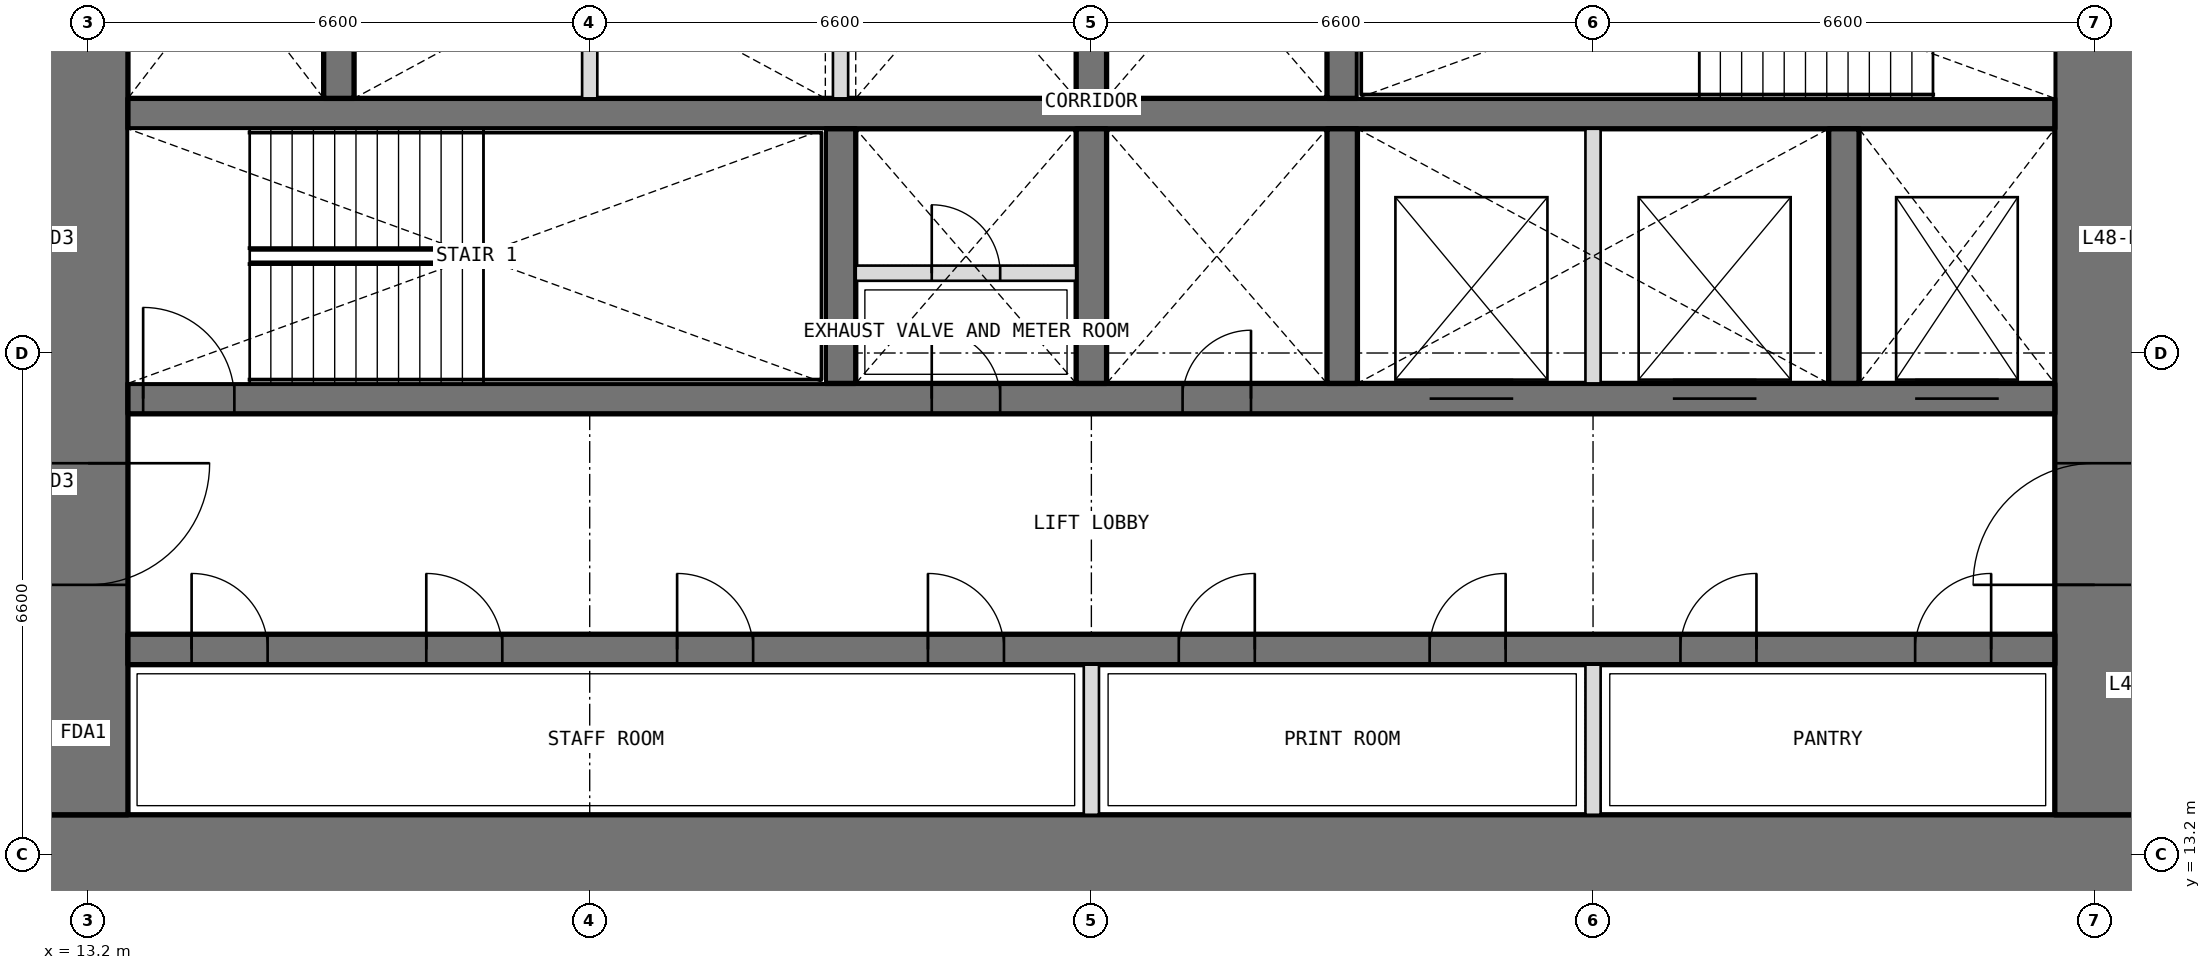
"""IFC4 building model, lengths in metres.
Left out: names, types, materials, properties, quantities, classifications, styles, units other than length and angle.
Written with IfcOpenShell. Run it as: python <this file> out.ifc"""

import sys

from ifc_helpers import new_model, si_unit, direction, frame, frame_2d, origin, place, context, subcontext, project, spatial, rectangle, extrude, element, fill, save


model = new_model("IFC4")
c1 = context("Model", 3, precision=1e-05, world=origin(), true_north=direction((0.0, 1.0)))
c2 = subcontext(c1, "Body", "Model", "MODEL_VIEW")
j1 = project(units=[si_unit("LENGTHUNIT", "METRE"), si_unit("PLANEANGLEUNIT", "RADIAN")], contexts=[c1])
p1 = place(None, origin())
s1 = spatial("IfcSite", under=j1, at=p1, CompositionType="ELEMENT")
p2 = place(p1, origin())
s2 = spatial("IfcBuilding", under=s1, at=p2, CompositionType="ELEMENT")
p3 = place(p2, frame((0.0, 0.0, 210.3)))
s3 = spatial("IfcBuildingStorey", under=s2, at=p3, CompositionType="ELEMENT", Elevation=210.3)
p4 = place(p3, frame((12.675, 13.2, 0.0), z_axis=(0.0, 0.0, 1.0), x_axis=(1.0, 0.0, 0.0)))
e1 = element("IfcWall", 1, at=p4, inside=s3, PredefinedType="SHEAR", context=c2, shape_type="SweptSolid", body=[
    extrude(rectangle(XDim=27.45, YDim=1.05, at=frame_2d((13.725, 0.0))), origin(), (0.0, 0.0, 1.0), 4.2),
])
p5 = place(p3, frame((39.6, 13.725, 0.0), z_axis=(0.0, 0.0, 1.0), x_axis=(0.0, 1.0, 0.0)))
e2 = element("IfcWall", 2, at=p5, inside=s3, PredefinedType="SHEAR", context=c2, shape_type="SweptSolid", body=[
    extrude(rectangle(XDim=18.75, YDim=1.05, at=frame_2d((9.375, 0.0))), origin(), (0.0, 0.0, 1.0), 4.2),
])
p6 = place(p5, frame((3.025, 0.0, 0.0)))
e3 = element("IfcOpeningElement", 3, at=p6, cuts=e2, PredefinedType="OPENING", context=c2, shape_type="SweptSolid", body=[
    extrude(rectangle(XDim=1.6, YDim=2.1, at=frame_2d((0.8, 1.05))), frame((0.0, 0.535, 0.0), z_axis=(0.0, -1.0, 0.0), x_axis=(1.0, 0.0, 0.0)), (0.0, 0.0, 1.0), 1.07),
])
p7 = place(p5, frame((13.825, 0.0, 0.0)))
e4 = element("IfcOpeningElement", 4, at=p7, cuts=e2, PredefinedType="OPENING", context=c2, shape_type="SweptSolid", body=[
    extrude(rectangle(XDim=1.6, YDim=2.1, at=frame_2d((0.8, 1.05))), frame((0.0, 0.535, 0.0), z_axis=(0.0, -1.0, 0.0), x_axis=(1.0, 0.0, 0.0)), (0.0, 0.0, 1.0), 1.07),
])
p8 = place(p3, frame((13.2, 32.475, 0.0), z_axis=(0.0, 0.0, 1.0), x_axis=(0.0, -1.0, 0.0)))
e5 = element("IfcWall", 5, at=p8, inside=s3, PredefinedType="SHEAR", context=c2, shape_type="SweptSolid", body=[
    extrude(rectangle(XDim=18.75, YDim=1.05, at=frame_2d((9.375, 0.0))), origin(), (0.0, 0.0, 1.0), 4.2),
])
p9 = place(p8, frame((14.125, 0.0, 0.0)))
e6 = element("IfcOpeningElement", 6, at=p9, cuts=e5, PredefinedType="OPENING", context=c2, shape_type="SweptSolid", body=[
    extrude(rectangle(XDim=1.6, YDim=2.1, at=frame_2d((0.8, 1.05))), frame((0.0, 0.535, 0.0), z_axis=(0.0, -1.0, 0.0), x_axis=(1.0, 0.0, 0.0)), (0.0, 0.0, 1.0), 1.07),
])
p10 = place(p8, frame((3.325, 0.0, 0.0)))
e7 = element("IfcOpeningElement", 7, at=p10, cuts=e5, PredefinedType="OPENING", context=c2, shape_type="SweptSolid", body=[
    extrude(rectangle(XDim=1.6, YDim=2.1, at=frame_2d((0.8, 1.05))), frame((0.0, 0.535, 0.0), z_axis=(0.0, -1.0, 0.0), x_axis=(1.0, 0.0, 0.0)), (0.0, 0.0, 1.0), 1.07),
])
p11 = place(p3, frame((13.725, 15.9, 0.0), z_axis=(0.0, 0.0, 1.0), x_axis=(1.0, 0.0, 0.0)))
e8 = element("IfcWall", 8, at=p11, inside=s3, PredefinedType="SHEAR", context=c2, shape_type="SweptSolid", body=[
    extrude(rectangle(XDim=25.35, YDim=0.4, at=frame_2d((12.675, 0.0))), origin(), (0.0, 0.0, 1.0), 4.2),
])
p12 = place(p11, frame((0.837, 0.0, 0.0)))
e9 = element("IfcOpeningElement", 9, at=p12, cuts=e8, PredefinedType="OPENING", context=c2, shape_type="SweptSolid", body=[
    extrude(rectangle(XDim=1.0, YDim=2.1, at=frame_2d((0.5, 1.05))), frame((0.0, 0.21, 0.0), z_axis=(0.0, -1.0, 0.0), x_axis=(1.0, 0.0, 0.0)), (0.0, 0.0, 1.0), 0.42),
])
p13 = place(p11, frame((3.925, 0.0, 0.0)))
e10 = element("IfcOpeningElement", 10, at=p13, cuts=e8, PredefinedType="OPENING", context=c2, shape_type="SweptSolid", body=[
    extrude(rectangle(XDim=1.0, YDim=2.1, at=frame_2d((0.5, 1.05))), frame((0.0, 0.21, 0.0), z_axis=(0.0, -1.0, 0.0), x_axis=(1.0, 0.0, 0.0)), (0.0, 0.0, 1.0), 0.42),
])
p14 = place(p11, frame((7.225, 0.0, 0.0)))
e11 = element("IfcOpeningElement", 11, at=p14, cuts=e8, PredefinedType="OPENING", context=c2, shape_type="SweptSolid", body=[
    extrude(rectangle(XDim=1.0, YDim=2.1, at=frame_2d((0.5, 1.05))), frame((0.0, 0.21, 0.0), z_axis=(0.0, -1.0, 0.0), x_axis=(1.0, 0.0, 0.0)), (0.0, 0.0, 1.0), 0.42),
])
p15 = place(p11, frame((10.525, 0.0, 0.0)))
e12 = element("IfcOpeningElement", 12, at=p15, cuts=e8, PredefinedType="OPENING", context=c2, shape_type="SweptSolid", body=[
    extrude(rectangle(XDim=1.0, YDim=2.1, at=frame_2d((0.5, 1.05))), frame((0.0, 0.21, 0.0), z_axis=(0.0, -1.0, 0.0), x_axis=(1.0, 0.0, 0.0)), (0.0, 0.0, 1.0), 0.42),
])
p16 = place(p11, frame((13.825, 0.0, 0.0)))
e13 = element("IfcOpeningElement", 13, at=p16, cuts=e8, PredefinedType="OPENING", context=c2, shape_type="SweptSolid", body=[
    extrude(rectangle(XDim=1.0, YDim=2.1, at=frame_2d((0.5, 1.05))), frame((0.0, 0.21, 0.0), z_axis=(0.0, -1.0, 0.0), x_axis=(1.0, 0.0, 0.0)), (0.0, 0.0, 1.0), 0.42),
])
p17 = place(p11, frame((17.125, 0.0, 0.0)))
e14 = element("IfcOpeningElement", 14, at=p17, cuts=e8, PredefinedType="OPENING", context=c2, shape_type="SweptSolid", body=[
    extrude(rectangle(XDim=1.0, YDim=2.1, at=frame_2d((0.5, 1.05))), frame((0.0, 0.21, 0.0), z_axis=(0.0, -1.0, 0.0), x_axis=(1.0, 0.0, 0.0)), (0.0, 0.0, 1.0), 0.42),
])
p18 = place(p11, frame((20.425, 0.0, 0.0)))
e15 = element("IfcOpeningElement", 15, at=p18, cuts=e8, PredefinedType="OPENING", context=c2, shape_type="SweptSolid", body=[
    extrude(rectangle(XDim=1.0, YDim=2.1, at=frame_2d((0.5, 1.05))), frame((0.0, 0.21, 0.0), z_axis=(0.0, -1.0, 0.0), x_axis=(1.0, 0.0, 0.0)), (0.0, 0.0, 1.0), 0.42),
])
p19 = place(p11, frame((23.512, 0.0, 0.0)))
e16 = element("IfcOpeningElement", 16, at=p19, cuts=e8, PredefinedType="OPENING", context=c2, shape_type="SweptSolid", body=[
    extrude(rectangle(XDim=1.0, YDim=2.1, at=frame_2d((0.5, 1.05))), frame((0.0, 0.21, 0.0), z_axis=(0.0, -1.0, 0.0), x_axis=(1.0, 0.0, 0.0)), (0.0, 0.0, 1.0), 0.42),
])
p20 = place(p3, frame((13.725, 19.2, 0.0), z_axis=(0.0, 0.0, 1.0), x_axis=(1.0, 0.0, 0.0)))
e17 = element("IfcWall", 17, at=p20, inside=s3, PredefinedType="SHEAR", context=c2, shape_type="SweptSolid", body=[
    extrude(rectangle(XDim=25.35, YDim=0.4, at=frame_2d((12.675, 0.0))), origin(), (0.0, 0.0, 1.0), 4.2),
])
p21 = place(p20, frame((10.575, 0.0, 0.0)))
e18 = element("IfcOpeningElement", 18, at=p21, cuts=e17, PredefinedType="OPENING", context=c2, shape_type="SweptSolid", body=[
    extrude(rectangle(XDim=0.9, YDim=2.1, at=frame_2d((0.45, 1.05))), frame((0.0, 0.21, 0.0), z_axis=(0.0, -1.0, 0.0), x_axis=(1.0, 0.0, 0.0)), (0.0, 0.0, 1.0), 0.42),
])
p22 = place(p20, frame((13.875, 0.0, 0.0)))
e19 = element("IfcOpeningElement", 19, at=p22, cuts=e17, PredefinedType="OPENING", context=c2, shape_type="SweptSolid", body=[
    extrude(rectangle(XDim=0.9, YDim=2.1, at=frame_2d((0.45, 1.05))), frame((0.0, 0.21, 0.0), z_axis=(0.0, -1.0, 0.0), x_axis=(1.0, 0.0, 0.0)), (0.0, 0.0, 1.0), 0.42),
])
p23 = place(p20, frame((0.2, 0.0, 0.0)))
e20 = element("IfcOpeningElement", 20, at=p23, cuts=e17, PredefinedType="OPENING", context=c2, shape_type="SweptSolid", body=[
    extrude(rectangle(XDim=1.2, YDim=2.1, at=frame_2d((0.6, 1.05))), frame((0.0, 0.21, 0.0), z_axis=(0.0, -1.0, 0.0), x_axis=(1.0, 0.0, 0.0)), (0.0, 0.0, 1.0), 0.42),
])
p24 = place(p20, frame((23.512, 0.0, 0.0)))
e21 = element("IfcOpeningElement", 21, at=p24, cuts=e17, PredefinedType="OPENING", context=c2, shape_type="SweptSolid", body=[
    extrude(rectangle(XDim=1.1, YDim=2.1, at=frame_2d((0.55, 1.05))), frame((0.0, 0.21, 0.0), z_axis=(0.0, -1.0, 0.0), x_axis=(1.0, 0.0, 0.0)), (0.0, 0.0, 1.0), 0.42),
])
p25 = place(p20, frame((17.125, 0.0, 0.0)))
e22 = element("IfcOpeningElement", 22, at=p25, cuts=e17, PredefinedType="OPENING", context=c2, shape_type="SweptSolid", body=[
    extrude(rectangle(XDim=1.1, YDim=2.1, at=frame_2d((0.55, 1.05))), frame((0.0, 0.21, 0.0), z_axis=(0.0, -1.0, 0.0), x_axis=(1.0, 0.0, 0.0)), (0.0, 0.0, 1.0), 0.42),
])
p26 = place(p20, frame((20.325, 0.0, 0.0)))
e23 = element("IfcOpeningElement", 23, at=p26, cuts=e17, PredefinedType="OPENING", context=c2, shape_type="SweptSolid", body=[
    extrude(rectangle(XDim=1.1, YDim=2.1, at=frame_2d((0.55, 1.05))), frame((0.0, 0.21, 0.0), z_axis=(0.0, -1.0, 0.0), x_axis=(1.0, 0.0, 0.0)), (0.0, 0.0, 1.0), 0.42),
])
p27 = place(p3, frame((13.725, 22.95, 0.0), z_axis=(0.0, 0.0, 1.0), x_axis=(1.0, 0.0, 0.0)))
e24 = element("IfcWall", 24, at=p27, inside=s3, PredefinedType="SHEAR", context=c2, shape_type="SweptSolid", body=[
    extrude(rectangle(XDim=25.35, YDim=0.4, at=frame_2d((12.675, 0.0))), origin(), (0.0, 0.0, 1.0), 4.2),
])
for number, where, z_axis, x_axis in (
    (25, (23.1, 19.4, 0.0), (0.0, 0.0, 1.0), (0.0, 1.0, 0.0)),
    (26, (26.4, 19.4, 0.0), (0.0, 0.0, 1.0), (0.0, 1.0, 0.0)),
    (27, (29.7, 19.4, 0.0), (0.0, 0.0, 1.0), (0.0, 1.0, 0.0)),
    (28, (36.3, 19.4, 0.0), (0.0, 0.0, 1.0), (0.0, 1.0, 0.0)),
    (29, (16.5, 23.15, 0.0), (0.0, 0.0, 1.0), (0.0, 1.0, 0.0)),
    (30, (26.4, 23.15, 0.0), (0.0, 0.0, 1.0), (0.0, 1.0, 0.0)),
    (31, (29.7, 23.15, 0.0), (0.0, 0.0, 1.0), (0.0, 1.0, 0.0)),
):
    element("IfcWall", number, at=place(p3, frame(where, z_axis=z_axis, x_axis=x_axis)), inside=s3, PredefinedType="SHEAR", context=c2, shape_type="SweptSolid", body=[
        extrude(rectangle(XDim=3.35, YDim=0.4, at=frame_2d((1.675, 0.0))), origin(), (0.0, 0.0, 1.0), 4.2),
    ])
for number, where, z_axis, x_axis in (
    (32, (26.4, 13.725, 0.0), (0.0, 0.0, 1.0), (0.0, 1.0, 0.0)),
    (33, (33.0, 13.725, 0.0), (0.0, 0.0, 1.0), (0.0, 1.0, 0.0)),
):
    element("IfcWall", number, at=place(p3, frame(where, z_axis=z_axis, x_axis=x_axis)), inside=s3, PredefinedType="PARTITIONING", context=c2, shape_type="SweptSolid", body=[
        extrude(rectangle(XDim=1.975, YDim=0.2, at=frame_2d((0.987, 0.0))), origin(), (0.0, 0.0, 1.0), 4.2),
    ])
for number, where, z_axis, x_axis in (
    (34, (33.0, 19.4, 0.0), (0.0, 0.0, 1.0), (0.0, 1.0, 0.0)),
    (35, (19.8, 23.15, 0.0), (0.0, 0.0, 1.0), (0.0, 1.0, 0.0)),
    (36, (23.1, 23.15, 0.0), (0.0, 0.0, 1.0), (0.0, 1.0, 0.0)),
):
    element("IfcWall", number, at=place(p3, frame(where, z_axis=z_axis, x_axis=x_axis)), inside=s3, PredefinedType="PARTITIONING", context=c2, shape_type="SweptSolid", body=[
        extrude(rectangle(XDim=3.35, YDim=0.2, at=frame_2d((1.675, 0.0))), origin(), (0.0, 0.0, 1.0), 4.2),
    ])
p28 = place(p3, frame((23.3, 20.85, 0.0), z_axis=(0.0, 0.0, 1.0), x_axis=(1.0, 0.0, 0.0)))
e37 = element("IfcWall", 37, at=p28, inside=s3, PredefinedType="PARTITIONING", context=c2, shape_type="SweptSolid", body=[
    extrude(rectangle(XDim=2.9, YDim=0.2, at=frame_2d((1.45, 0.0))), origin(), (0.0, 0.0, 1.0), 3.9),
])
p29 = place(p28, frame((1.0, 0.0, 0.0)))
e38 = element("IfcOpeningElement", 38, at=p29, cuts=e37, PredefinedType="OPENING", context=c2, shape_type="SweptSolid", body=[
    extrude(rectangle(XDim=0.9, YDim=2.1, at=frame_2d((0.45, 1.05))), frame((0.0, 0.11, 0.0), z_axis=(0.0, -1.0, 0.0), x_axis=(1.0, 0.0, 0.0)), (0.0, 0.0, 1.0), 0.22),
])
p30 = place(p21, origin())
e39 = element("IfcDoor", 39, at=p30, inside=s3, OperationType="SINGLE_SWING_LEFT", PredefinedType="DOOR", context=c2, shape_type="SweptSolid", body=[
    extrude(rectangle(XDim=0.9, YDim=2.1, at=frame_2d((0.45, 1.05))), frame((0.0, 0.025, 0.0), z_axis=(0.0, -1.0, 0.0), x_axis=(1.0, 0.0, 0.0)), (0.0, 0.0, 1.0), 0.05),
])
fill(e18, e39)
p31 = place(p29, origin())
e40 = element("IfcDoor", 40, at=p31, inside=s3, OperationType="SINGLE_SWING_LEFT", PredefinedType="DOOR", context=c2, shape_type="SweptSolid", body=[
    extrude(rectangle(XDim=0.9, YDim=2.1, at=frame_2d((0.45, 1.05))), frame((0.0, 0.025, 0.0), z_axis=(0.0, -1.0, 0.0), x_axis=(1.0, 0.0, 0.0)), (0.0, 0.0, 1.0), 0.05),
])
fill(e38, e40)
p32 = place(p22, origin())
e41 = element("IfcDoor", 41, at=p32, inside=s3, OperationType="SINGLE_SWING_RIGHT", PredefinedType="DOOR", context=c2, shape_type="SweptSolid", body=[
    extrude(rectangle(XDim=0.9, YDim=2.1, at=frame_2d((0.45, 1.05))), frame((0.0, 0.025, 0.0), z_axis=(0.0, -1.0, 0.0), x_axis=(1.0, 0.0, 0.0)), (0.0, 0.0, 1.0), 0.05),
])
fill(e19, e41)
p33 = place(p12, origin())
e42 = element("IfcDoor", 42, at=p33, inside=s3, OperationType="SINGLE_SWING_LEFT", PredefinedType="DOOR", context=c2, shape_type="SweptSolid", body=[
    extrude(rectangle(XDim=1.0, YDim=2.1, at=frame_2d((0.5, 1.05))), frame((0.0, 0.025, 0.0), z_axis=(0.0, -1.0, 0.0), x_axis=(1.0, 0.0, 0.0)), (0.0, 0.0, 1.0), 0.05),
])
fill(e9, e42)
p34 = place(p13, origin())
e43 = element("IfcDoor", 43, at=p34, inside=s3, OperationType="SINGLE_SWING_LEFT", PredefinedType="DOOR", context=c2, shape_type="SweptSolid", body=[
    extrude(rectangle(XDim=1.0, YDim=2.1, at=frame_2d((0.5, 1.05))), frame((0.0, 0.025, 0.0), z_axis=(0.0, -1.0, 0.0), x_axis=(1.0, 0.0, 0.0)), (0.0, 0.0, 1.0), 0.05),
])
fill(e10, e43)
p35 = place(p14, origin())
e44 = element("IfcDoor", 44, at=p35, inside=s3, OperationType="SINGLE_SWING_LEFT", PredefinedType="DOOR", context=c2, shape_type="SweptSolid", body=[
    extrude(rectangle(XDim=1.0, YDim=2.1, at=frame_2d((0.5, 1.05))), frame((0.0, 0.025, 0.0), z_axis=(0.0, -1.0, 0.0), x_axis=(1.0, 0.0, 0.0)), (0.0, 0.0, 1.0), 0.05),
])
fill(e11, e44)
p36 = place(p15, origin())
e45 = element("IfcDoor", 45, at=p36, inside=s3, OperationType="SINGLE_SWING_LEFT", PredefinedType="DOOR", context=c2, shape_type="SweptSolid", body=[
    extrude(rectangle(XDim=1.0, YDim=2.1, at=frame_2d((0.5, 1.05))), frame((0.0, 0.025, 0.0), z_axis=(0.0, -1.0, 0.0), x_axis=(1.0, 0.0, 0.0)), (0.0, 0.0, 1.0), 0.05),
])
fill(e12, e45)
p37 = place(p16, origin())
e46 = element("IfcDoor", 46, at=p37, inside=s3, OperationType="SINGLE_SWING_RIGHT", PredefinedType="DOOR", context=c2, shape_type="SweptSolid", body=[
    extrude(rectangle(XDim=1.0, YDim=2.1, at=frame_2d((0.5, 1.05))), frame((0.0, 0.025, 0.0), z_axis=(0.0, -1.0, 0.0), x_axis=(1.0, 0.0, 0.0)), (0.0, 0.0, 1.0), 0.05),
])
fill(e13, e46)
p38 = place(p17, origin())
e47 = element("IfcDoor", 47, at=p38, inside=s3, OperationType="SINGLE_SWING_RIGHT", PredefinedType="DOOR", context=c2, shape_type="SweptSolid", body=[
    extrude(rectangle(XDim=1.0, YDim=2.1, at=frame_2d((0.5, 1.05))), frame((0.0, 0.025, 0.0), z_axis=(0.0, -1.0, 0.0), x_axis=(1.0, 0.0, 0.0)), (0.0, 0.0, 1.0), 0.05),
])
fill(e14, e47)
p39 = place(p18, origin())
e48 = element("IfcDoor", 48, at=p39, inside=s3, OperationType="SINGLE_SWING_RIGHT", PredefinedType="DOOR", context=c2, shape_type="SweptSolid", body=[
    extrude(rectangle(XDim=1.0, YDim=2.1, at=frame_2d((0.5, 1.05))), frame((0.0, 0.025, 0.0), z_axis=(0.0, -1.0, 0.0), x_axis=(1.0, 0.0, 0.0)), (0.0, 0.0, 1.0), 0.05),
])
fill(e15, e48)
p40 = place(p19, origin())
e49 = element("IfcDoor", 49, at=p40, inside=s3, OperationType="SINGLE_SWING_RIGHT", PredefinedType="DOOR", context=c2, shape_type="SweptSolid", body=[
    extrude(rectangle(XDim=1.0, YDim=2.1, at=frame_2d((0.5, 1.05))), frame((0.0, 0.025, 0.0), z_axis=(0.0, -1.0, 0.0), x_axis=(1.0, 0.0, 0.0)), (0.0, 0.0, 1.0), 0.05),
])
fill(e16, e49)
p41 = place(p23, origin())
e50 = element("IfcDoor", 50, at=p41, inside=s3, OperationType="SINGLE_SWING_LEFT", PredefinedType="DOOR", context=c2, shape_type="SweptSolid", body=[
    extrude(rectangle(XDim=1.2, YDim=2.1, at=frame_2d((0.6, 1.05))), frame((0.0, 0.025, 0.0), z_axis=(0.0, -1.0, 0.0), x_axis=(1.0, 0.0, 0.0)), (0.0, 0.0, 1.0), 0.05),
])
fill(e20, e50)
p42 = place(p9, origin())
e51 = element("IfcDoor", 51, at=p42, inside=s3, OperationType="DOUBLE_DOOR_DOUBLE_SWING", PredefinedType="DOOR", context=c2, shape_type="SweptSolid", body=[
    extrude(rectangle(XDim=1.6, YDim=2.1, at=frame_2d((0.8, 1.05))), frame((0.0, 0.025, 0.0), z_axis=(0.0, -1.0, 0.0), x_axis=(1.0, 0.0, 0.0)), (0.0, 0.0, 1.0), 0.05),
])
fill(e6, e51)
p43 = place(p6, origin())
e52 = element("IfcDoor", 52, at=p43, inside=s3, OperationType="DOUBLE_DOOR_DOUBLE_SWING", PredefinedType="DOOR", context=c2, shape_type="SweptSolid", body=[
    extrude(rectangle(XDim=1.6, YDim=2.1, at=frame_2d((0.8, 1.05))), frame((0.0, 0.025, 0.0), z_axis=(0.0, -1.0, 0.0), x_axis=(1.0, 0.0, 0.0)), (0.0, 0.0, 1.0), 0.05),
])
fill(e3, e52)
p44 = place(p24, origin())
e53 = element("IfcDoor", 53, at=p44, inside=s3, OperationType="DOUBLE_DOOR_SLIDING", PredefinedType="DOOR", context=c2, shape_type="SweptSolid", body=[
    extrude(rectangle(XDim=1.1, YDim=2.1, at=frame_2d((0.55, 1.05))), frame((0.0, 0.025, 0.0), z_axis=(0.0, -1.0, 0.0), x_axis=(1.0, 0.0, 0.0)), (0.0, 0.0, 1.0), 0.05),
])
fill(e21, e53)
p45 = place(p25, origin())
e54 = element("IfcDoor", 54, at=p45, inside=s3, OperationType="DOUBLE_DOOR_SLIDING", PredefinedType="DOOR", context=c2, shape_type="SweptSolid", body=[
    extrude(rectangle(XDim=1.1, YDim=2.1, at=frame_2d((0.55, 1.05))), frame((0.0, 0.025, 0.0), z_axis=(0.0, -1.0, 0.0), x_axis=(1.0, 0.0, 0.0)), (0.0, 0.0, 1.0), 0.05),
])
fill(e22, e54)
p46 = place(p26, origin())
e55 = element("IfcDoor", 55, at=p46, inside=s3, OperationType="DOUBLE_DOOR_SLIDING", PredefinedType="DOOR", context=c2, shape_type="SweptSolid", body=[
    extrude(rectangle(XDim=1.1, YDim=2.1, at=frame_2d((0.55, 1.05))), frame((0.0, 0.025, 0.0), z_axis=(0.0, -1.0, 0.0), x_axis=(1.0, 0.0, 0.0)), (0.0, 0.0, 1.0), 0.05),
])
fill(e23, e55)
save(model, sys.argv[1])
